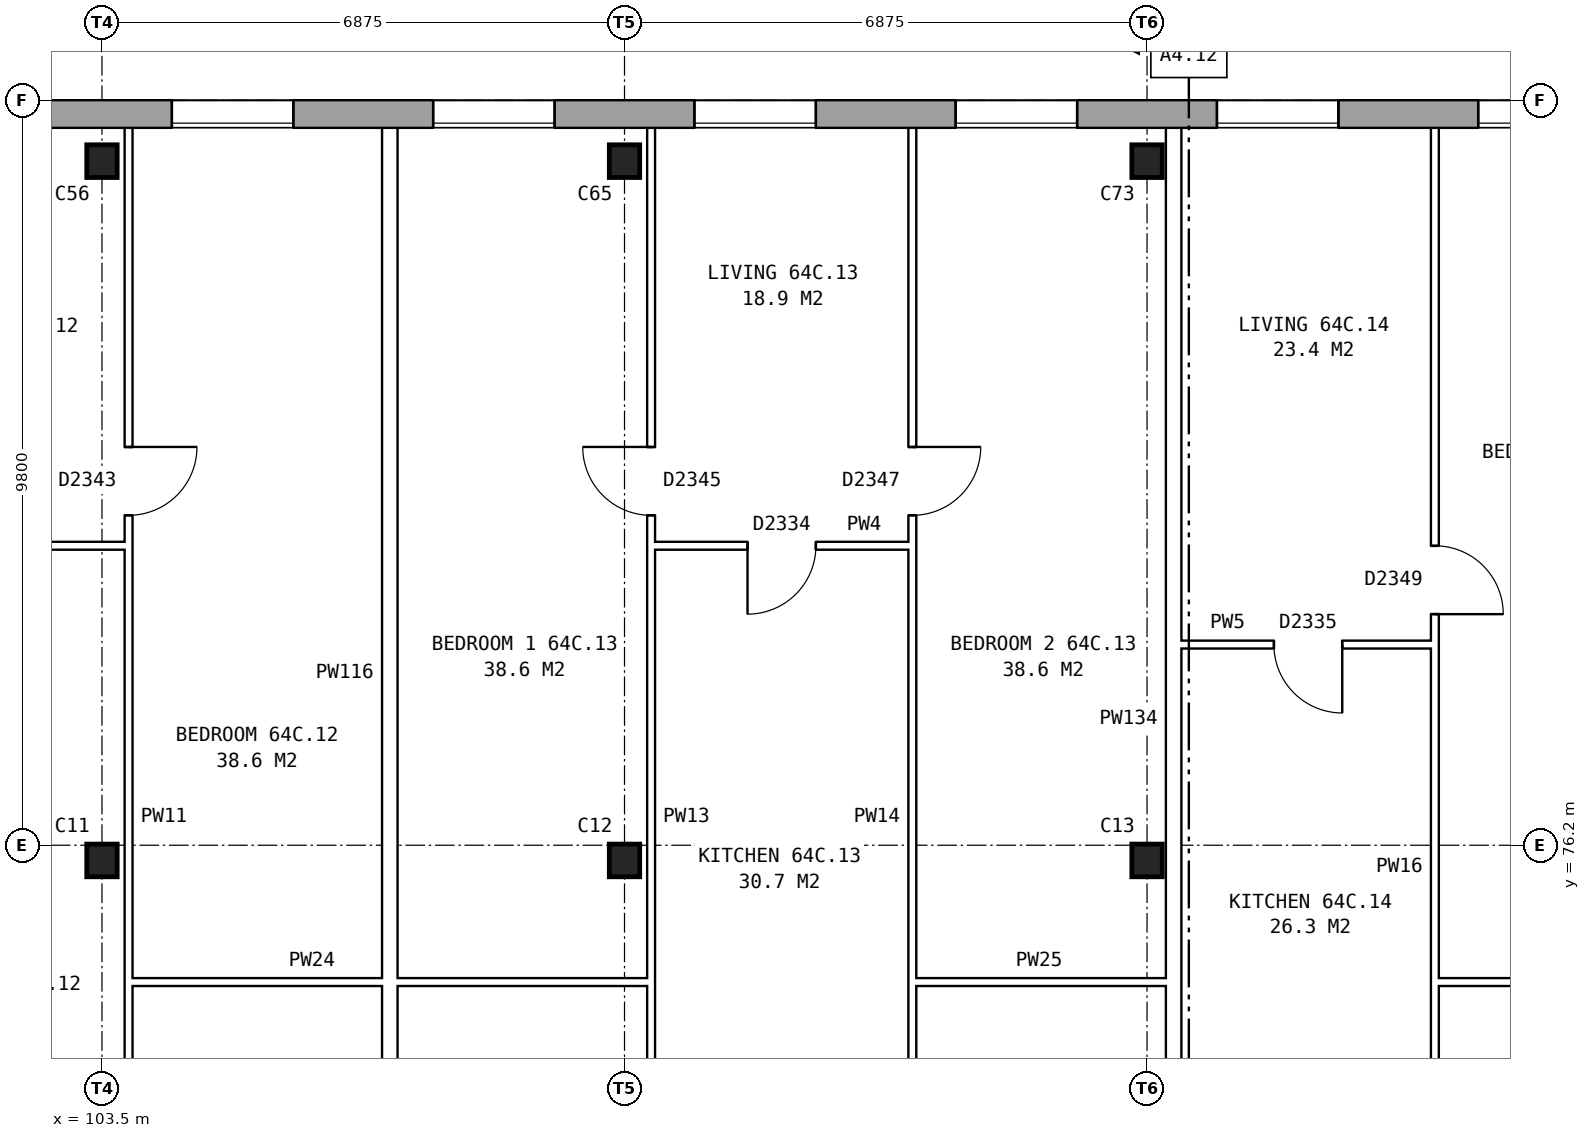
"""IFC4 building model, lengths in metres.
Left out: names, types, materials, properties, quantities, classifications, styles, units other than length and angle.
Written with IfcOpenShell. Run it as: python <this file> out.ifc"""

import sys

from ifc_helpers import new_model, si_unit, direction, frame, frame_2d, origin, origin_2d, place, context, subcontext, project, spatial, rectangle, i_section, extrude, element, fill, save


model = new_model("IFC4")
c1 = context("Model", 3, precision=1e-05, world=origin(), true_north=direction((0.0, 1.0)))
c2 = subcontext(c1, "Body", "Model", "MODEL_VIEW")
j1 = project(units=[si_unit("LENGTHUNIT", "METRE"), si_unit("PLANEANGLEUNIT", "RADIAN")], contexts=[c1])
p1 = place(None, origin())
s1 = spatial("IfcSite", under=j1, at=p1, CompositionType="ELEMENT")
p2 = place(p1, origin())
s2 = spatial("IfcBuilding", under=s1, at=p2, CompositionType="ELEMENT")
p3 = place(p2, frame((0.0, 0.0, 227.6)))
s3 = spatial("IfcBuildingStorey", under=s2, at=p3, CompositionType="ELEMENT", Elevation=227.6)
for number, where, z_axis, x_axis in (
    (1, (103.5, 76.0, 0.0), (0.0, 0.0, 1.0), (1.0, 0.0, 0.0)),
    (2, (110.375, 76.0, 0.0), (0.0, 0.0, 1.0), (1.0, 0.0, 0.0)),
    (3, (117.25, 76.0, 0.0), (0.0, 0.0, 1.0), (1.0, 0.0, 0.0)),
    (4, (103.5, 85.2, 0.0), (0.0, 0.0, 1.0), (1.0, 0.0, 0.0)),
    (5, (110.375, 85.2, 0.0), (0.0, 0.0, 1.0), (1.0, 0.0, 0.0)),
    (6, (117.25, 85.2, 0.0), (0.0, 0.0, 1.0), (1.0, 0.0, 0.0)),
):
    element("IfcColumn", number, at=place(p3, frame(where, z_axis=z_axis, x_axis=x_axis)), inside=s3, PredefinedType="COLUMN", context=c2, shape_type="SweptSolid", body=[
        extrude(i_section(OverallWidth=0.4, OverallDepth=0.43, WebThickness=0.04, FlangeThickness=0.04, at=origin_2d()), origin(), (0.0, 0.0, 1.0), 2.85),
    ])
p4 = place(p3, frame((131.05, 85.82, 0.0), z_axis=(0.0, 0.0, 1.0), x_axis=(-1.0, 0.0, 0.0)))
e7 = element("IfcWall", 7, at=p4, inside=s3, PredefinedType="STANDARD", context=c2, shape_type="SweptSolid", body=[
    extrude(rectangle(XDim=55.1, YDim=0.36, at=frame_2d((27.55, 0.0))), origin(), (0.0, 0.0, 1.0), 2.85),
])
p5 = place(p4, frame((0.969, 0.0, 0.8)))
e8 = element("IfcOpeningElement", 8, at=p5, cuts=e7, PredefinedType="OPENING", context=c2, shape_type="SweptSolid", body=[
    extrude(rectangle(XDim=1.6, YDim=1.8, at=frame_2d((0.8, 0.9))), frame((0.0, 0.19, 0.0), z_axis=(0.0, -1.0, 0.0), x_axis=(1.0, 0.0, 0.0)), (0.0, 0.0, 1.0), 0.38),
])
p6 = place(p4, frame((4.406, 0.0, 0.8)))
e9 = element("IfcOpeningElement", 9, at=p6, cuts=e7, PredefinedType="OPENING", context=c2, shape_type="SweptSolid", body=[
    extrude(rectangle(XDim=1.6, YDim=1.8, at=frame_2d((0.8, 0.9))), frame((0.0, 0.19, 0.0), z_axis=(0.0, -1.0, 0.0), x_axis=(1.0, 0.0, 0.0)), (0.0, 0.0, 1.0), 0.38),
])
p7 = place(p4, frame((7.844, 0.0, 0.8)))
e10 = element("IfcOpeningElement", 10, at=p7, cuts=e7, PredefinedType="OPENING", context=c2, shape_type="SweptSolid", body=[
    extrude(rectangle(XDim=1.6, YDim=1.8, at=frame_2d((0.8, 0.9))), frame((0.0, 0.19, 0.0), z_axis=(0.0, -1.0, 0.0), x_axis=(1.0, 0.0, 0.0)), (0.0, 0.0, 1.0), 0.38),
])
p8 = place(p4, frame((11.281, 0.0, 0.8)))
e11 = element("IfcOpeningElement", 11, at=p8, cuts=e7, PredefinedType="OPENING", context=c2, shape_type="SweptSolid", body=[
    extrude(rectangle(XDim=1.6, YDim=1.8, at=frame_2d((0.8, 0.9))), frame((0.0, 0.19, 0.0), z_axis=(0.0, -1.0, 0.0), x_axis=(1.0, 0.0, 0.0)), (0.0, 0.0, 1.0), 0.38),
])
p9 = place(p4, frame((14.719, 0.0, 0.8)))
e12 = element("IfcOpeningElement", 12, at=p9, cuts=e7, PredefinedType="OPENING", context=c2, shape_type="SweptSolid", body=[
    extrude(rectangle(XDim=1.6, YDim=1.8, at=frame_2d((0.8, 0.9))), frame((0.0, 0.19, 0.0), z_axis=(0.0, -1.0, 0.0), x_axis=(1.0, 0.0, 0.0)), (0.0, 0.0, 1.0), 0.38),
])
p10 = place(p4, frame((18.156, 0.0, 0.8)))
e13 = element("IfcOpeningElement", 13, at=p10, cuts=e7, PredefinedType="OPENING", context=c2, shape_type="SweptSolid", body=[
    extrude(rectangle(XDim=1.6, YDim=1.8, at=frame_2d((0.8, 0.9))), frame((0.0, 0.19, 0.0), z_axis=(0.0, -1.0, 0.0), x_axis=(1.0, 0.0, 0.0)), (0.0, 0.0, 1.0), 0.38),
])
p11 = place(p4, frame((21.594, 0.0, 0.8)))
e14 = element("IfcOpeningElement", 14, at=p11, cuts=e7, PredefinedType="OPENING", context=c2, shape_type="SweptSolid", body=[
    extrude(rectangle(XDim=1.6, YDim=1.8, at=frame_2d((0.8, 0.9))), frame((0.0, 0.19, 0.0), z_axis=(0.0, -1.0, 0.0), x_axis=(1.0, 0.0, 0.0)), (0.0, 0.0, 1.0), 0.38),
])
p12 = place(p4, frame((25.031, 0.0, 0.8)))
e15 = element("IfcOpeningElement", 15, at=p12, cuts=e7, PredefinedType="OPENING", context=c2, shape_type="SweptSolid", body=[
    extrude(rectangle(XDim=1.6, YDim=1.8, at=frame_2d((0.8, 0.9))), frame((0.0, 0.19, 0.0), z_axis=(0.0, -1.0, 0.0), x_axis=(1.0, 0.0, 0.0)), (0.0, 0.0, 1.0), 0.38),
])
p13 = place(p4, frame((28.469, 0.0, 0.8)))
e16 = element("IfcOpeningElement", 16, at=p13, cuts=e7, PredefinedType="OPENING", context=c2, shape_type="SweptSolid", body=[
    extrude(rectangle(XDim=1.6, YDim=1.8, at=frame_2d((0.8, 0.9))), frame((0.0, 0.19, 0.0), z_axis=(0.0, -1.0, 0.0), x_axis=(1.0, 0.0, 0.0)), (0.0, 0.0, 1.0), 0.38),
])
p14 = place(p4, frame((31.906, 0.0, 0.8)))
e17 = element("IfcOpeningElement", 17, at=p14, cuts=e7, PredefinedType="OPENING", context=c2, shape_type="SweptSolid", body=[
    extrude(rectangle(XDim=1.6, YDim=1.8, at=frame_2d((0.8, 0.9))), frame((0.0, 0.19, 0.0), z_axis=(0.0, -1.0, 0.0), x_axis=(1.0, 0.0, 0.0)), (0.0, 0.0, 1.0), 0.38),
])
p15 = place(p4, frame((35.344, 0.0, 0.8)))
e18 = element("IfcOpeningElement", 18, at=p15, cuts=e7, PredefinedType="OPENING", context=c2, shape_type="SweptSolid", body=[
    extrude(rectangle(XDim=1.6, YDim=1.8, at=frame_2d((0.8, 0.9))), frame((0.0, 0.19, 0.0), z_axis=(0.0, -1.0, 0.0), x_axis=(1.0, 0.0, 0.0)), (0.0, 0.0, 1.0), 0.38),
])
p16 = place(p4, frame((38.781, 0.0, 0.8)))
e19 = element("IfcOpeningElement", 19, at=p16, cuts=e7, PredefinedType="OPENING", context=c2, shape_type="SweptSolid", body=[
    extrude(rectangle(XDim=1.6, YDim=1.8, at=frame_2d((0.8, 0.9))), frame((0.0, 0.19, 0.0), z_axis=(0.0, -1.0, 0.0), x_axis=(1.0, 0.0, 0.0)), (0.0, 0.0, 1.0), 0.38),
])
p17 = place(p4, frame((42.219, 0.0, 0.8)))
e20 = element("IfcOpeningElement", 20, at=p17, cuts=e7, PredefinedType="OPENING", context=c2, shape_type="SweptSolid", body=[
    extrude(rectangle(XDim=1.6, YDim=1.8, at=frame_2d((0.8, 0.9))), frame((0.0, 0.19, 0.0), z_axis=(0.0, -1.0, 0.0), x_axis=(1.0, 0.0, 0.0)), (0.0, 0.0, 1.0), 0.38),
])
p18 = place(p4, frame((45.656, 0.0, 0.8)))
e21 = element("IfcOpeningElement", 21, at=p18, cuts=e7, PredefinedType="OPENING", context=c2, shape_type="SweptSolid", body=[
    extrude(rectangle(XDim=1.6, YDim=1.8, at=frame_2d((0.8, 0.9))), frame((0.0, 0.19, 0.0), z_axis=(0.0, -1.0, 0.0), x_axis=(1.0, 0.0, 0.0)), (0.0, 0.0, 1.0), 0.38),
])
p19 = place(p4, frame((49.094, 0.0, 0.8)))
e22 = element("IfcOpeningElement", 22, at=p19, cuts=e7, PredefinedType="OPENING", context=c2, shape_type="SweptSolid", body=[
    extrude(rectangle(XDim=1.6, YDim=1.8, at=frame_2d((0.8, 0.9))), frame((0.0, 0.19, 0.0), z_axis=(0.0, -1.0, 0.0), x_axis=(1.0, 0.0, 0.0)), (0.0, 0.0, 1.0), 0.38),
])
p20 = place(p4, frame((52.531, 0.0, 0.8)))
e23 = element("IfcOpeningElement", 23, at=p20, cuts=e7, PredefinedType="OPENING", context=c2, shape_type="SweptSolid", body=[
    extrude(rectangle(XDim=1.6, YDim=1.8, at=frame_2d((0.8, 0.9))), frame((0.0, 0.19, 0.0), z_axis=(0.0, -1.0, 0.0), x_axis=(1.0, 0.0, 0.0)), (0.0, 0.0, 1.0), 0.38),
])
p21 = place(p3, frame((103.85, 74.4, 0.0), z_axis=(0.0, 0.0, 1.0), x_axis=(1.0, 0.0, 0.0)))
e24 = element("IfcWall", 24, at=p21, inside=s3, PredefinedType="PARTITIONING", context=c2, shape_type="SweptSolid", body=[
    extrude(rectangle(XDim=6.875, YDim=0.1, at=frame_2d((3.438, 0.0))), origin(), (0.0, 0.0, 1.0), 2.85),
])
for number, where, z_axis, x_axis in (
    (25, (114.162, 74.4, 0.0), (0.0, 0.0, 1.0), (1.0, 0.0, 0.0)),
    (26, (121.037, 74.4, 0.0), (0.0, 0.0, 1.0), (1.0, 0.0, 0.0)),
):
    element("IfcWall", number, at=place(p3, frame(where, z_axis=z_axis, x_axis=x_axis)), inside=s3, PredefinedType="PARTITIONING", context=c2, shape_type="SweptSolid", body=[
        extrude(rectangle(XDim=3.338, YDim=0.1, at=frame_2d((1.669, 0.0))), origin(), (0.0, 0.0, 1.0), 2.85),
    ])
p22 = place(p3, frame((117.7, 78.84, 0.0), z_axis=(0.0, 0.0, 1.0), x_axis=(1.0, 0.0, 0.0)))
e27 = element("IfcWall", 27, at=p22, inside=s3, PredefinedType="PARTITIONING", context=c2, shape_type="SweptSolid", body=[
    extrude(rectangle(XDim=3.337, YDim=0.1, at=frame_2d((1.668, 0.0))), origin(), (0.0, 0.0, 1.0), 2.85),
])
p23 = place(p22, frame((1.219, 0.0, 0.0)))
e28 = element("IfcOpeningElement", 28, at=p23, cuts=e27, PredefinedType="OPENING", context=c2, shape_type="SweptSolid", body=[
    extrude(rectangle(XDim=0.9, YDim=2.1, at=frame_2d((0.45, 1.05))), frame((0.0, 0.06, 0.0), z_axis=(0.0, -1.0, 0.0), x_axis=(1.0, 0.0, 0.0)), (0.0, 0.0, 1.0), 0.12),
])
p24 = place(p3, frame((100.512, 80.14, 0.0), z_axis=(0.0, 0.0, 1.0), x_axis=(1.0, 0.0, 0.0)))
e29 = element("IfcWall", 29, at=p24, inside=s3, PredefinedType="PARTITIONING", context=c2, shape_type="SweptSolid", body=[
    extrude(rectangle(XDim=3.338, YDim=0.1, at=frame_2d((1.669, 0.0))), origin(), (0.0, 0.0, 1.0), 2.85),
])
p25 = place(p24, frame((1.219, 0.0, 0.0)))
e30 = element("IfcOpeningElement", 30, at=p25, cuts=e29, PredefinedType="OPENING", context=c2, shape_type="SweptSolid", body=[
    extrude(rectangle(XDim=0.9, YDim=2.1, at=frame_2d((0.45, 1.05))), frame((0.0, 0.06, 0.0), z_axis=(0.0, -1.0, 0.0), x_axis=(1.0, 0.0, 0.0)), (0.0, 0.0, 1.0), 0.12),
])
p26 = place(p3, frame((110.725, 80.14, 0.0), z_axis=(0.0, 0.0, 1.0), x_axis=(1.0, 0.0, 0.0)))
e31 = element("IfcWall", 31, at=p26, inside=s3, PredefinedType="PARTITIONING", context=c2, shape_type="SweptSolid", body=[
    extrude(rectangle(XDim=3.437, YDim=0.1, at=frame_2d((1.719, 0.0))), origin(), (0.0, 0.0, 1.0), 2.85),
])
p27 = place(p26, frame((1.269, 0.0, 0.0)))
e32 = element("IfcOpeningElement", 32, at=p27, cuts=e31, PredefinedType="OPENING", context=c2, shape_type="SweptSolid", body=[
    extrude(rectangle(XDim=0.9, YDim=2.1, at=frame_2d((0.45, 1.05))), frame((0.0, 0.06, 0.0), z_axis=(0.0, -1.0, 0.0), x_axis=(1.0, 0.0, 0.0)), (0.0, 0.0, 1.0), 0.12),
])
p28 = place(p3, frame((103.85, 71.3, 0.0), z_axis=(0.0, 0.0, 1.0), x_axis=(0.0, 1.0, 0.0)))
e33 = element("IfcWall", 33, at=p28, inside=s3, PredefinedType="PARTITIONING", context=c2, shape_type="SweptSolid", body=[
    extrude(rectangle(XDim=14.34, YDim=0.1, at=frame_2d((7.17, 0.0))), origin(), (0.0, 0.0, 1.0), 2.85),
])
p29 = place(p28, frame((9.24, 0.0, 0.0)))
e34 = element("IfcOpeningElement", 34, at=p29, cuts=e33, PredefinedType="OPENING", context=c2, shape_type="SweptSolid", body=[
    extrude(rectangle(XDim=0.9, YDim=2.1, at=frame_2d((0.45, 1.05))), frame((0.0, 0.06, 0.0), z_axis=(0.0, -1.0, 0.0), x_axis=(1.0, 0.0, 0.0)), (0.0, 0.0, 1.0), 0.12),
])
p30 = place(p28, frame((0.4, 0.0, 0.0)))
e35 = element("IfcOpeningElement", 35, at=p30, cuts=e33, PredefinedType="OPENING", context=c2, shape_type="SweptSolid", body=[
    extrude(rectangle(XDim=0.9, YDim=2.1, at=frame_2d((0.45, 1.05))), frame((0.0, 0.06, 0.0), z_axis=(0.0, -1.0, 0.0), x_axis=(1.0, 0.0, 0.0)), (0.0, 0.0, 1.0), 0.12),
])
p31 = place(p3, frame((107.287, 71.3, 0.0), z_axis=(0.0, 0.0, 1.0), x_axis=(0.0, 1.0, 0.0)))
e36 = element("IfcWall", 36, at=p31, inside=s3, PredefinedType="PARTITIONING", context=c2, shape_type="SweptSolid", body=[
    extrude(rectangle(XDim=14.34, YDim=0.2, at=frame_2d((7.17, 0.0))), origin(), (0.0, 0.0, 1.0), 2.85),
])
p32 = place(p3, frame((110.725, 71.3, 0.0), z_axis=(0.0, 0.0, 1.0), x_axis=(0.0, 1.0, 0.0)))
e37 = element("IfcWall", 37, at=p32, inside=s3, PredefinedType="PARTITIONING", context=c2, shape_type="SweptSolid", body=[
    extrude(rectangle(XDim=14.34, YDim=0.1, at=frame_2d((7.17, 0.0))), origin(), (0.0, 0.0, 1.0), 2.85),
])
p33 = place(p32, frame((9.24, 0.0, 0.0)))
e38 = element("IfcOpeningElement", 38, at=p33, cuts=e37, PredefinedType="OPENING", context=c2, shape_type="SweptSolid", body=[
    extrude(rectangle(XDim=0.9, YDim=2.1, at=frame_2d((0.45, 1.05))), frame((0.0, 0.06, 0.0), z_axis=(0.0, -1.0, 0.0), x_axis=(1.0, 0.0, 0.0)), (0.0, 0.0, 1.0), 0.12),
])
p34 = place(p32, frame((0.4, 0.0, 0.0)))
e39 = element("IfcOpeningElement", 39, at=p34, cuts=e37, PredefinedType="OPENING", context=c2, shape_type="SweptSolid", body=[
    extrude(rectangle(XDim=0.9, YDim=2.1, at=frame_2d((0.45, 1.05))), frame((0.0, 0.06, 0.0), z_axis=(0.0, -1.0, 0.0), x_axis=(1.0, 0.0, 0.0)), (0.0, 0.0, 1.0), 0.12),
])
p35 = place(p3, frame((114.162, 71.3, 0.0), z_axis=(0.0, 0.0, 1.0), x_axis=(0.0, 1.0, 0.0)))
e40 = element("IfcWall", 40, at=p35, inside=s3, PredefinedType="PARTITIONING", context=c2, shape_type="SweptSolid", body=[
    extrude(rectangle(XDim=14.34, YDim=0.1, at=frame_2d((7.17, 0.0))), origin(), (0.0, 0.0, 1.0), 2.85),
])
p36 = place(p35, frame((9.24, 0.0, 0.0)))
e41 = element("IfcOpeningElement", 41, at=p36, cuts=e40, PredefinedType="OPENING", context=c2, shape_type="SweptSolid", body=[
    extrude(rectangle(XDim=0.9, YDim=2.1, at=frame_2d((0.45, 1.05))), frame((0.0, 0.06, 0.0), z_axis=(0.0, -1.0, 0.0), x_axis=(1.0, 0.0, 0.0)), (0.0, 0.0, 1.0), 0.12),
])
p37 = place(p35, frame((0.4, 0.0, 0.0)))
e42 = element("IfcOpeningElement", 42, at=p37, cuts=e40, PredefinedType="OPENING", context=c2, shape_type="SweptSolid", body=[
    extrude(rectangle(XDim=0.9, YDim=2.1, at=frame_2d((0.45, 1.05))), frame((0.0, 0.06, 0.0), z_axis=(0.0, -1.0, 0.0), x_axis=(1.0, 0.0, 0.0)), (0.0, 0.0, 1.0), 0.12),
])
p38 = place(p3, frame((117.6, 71.3, 0.0), z_axis=(0.0, 0.0, 1.0), x_axis=(0.0, 1.0, 0.0)))
e43 = element("IfcWall", 43, at=p38, inside=s3, PredefinedType="PARTITIONING", context=c2, shape_type="SweptSolid", body=[
    extrude(rectangle(XDim=14.34, YDim=0.2, at=frame_2d((7.17, 0.0))), origin(), (0.0, 0.0, 1.0), 2.85),
])
p39 = place(p3, frame((121.037, 71.3, 0.0), z_axis=(0.0, 0.0, 1.0), x_axis=(0.0, 1.0, 0.0)))
e44 = element("IfcWall", 44, at=p39, inside=s3, PredefinedType="PARTITIONING", context=c2, shape_type="SweptSolid", body=[
    extrude(rectangle(XDim=14.34, YDim=0.1, at=frame_2d((7.17, 0.0))), origin(), (0.0, 0.0, 1.0), 2.85),
])
p40 = place(p39, frame((7.94, 0.0, 0.0)))
e45 = element("IfcOpeningElement", 45, at=p40, cuts=e44, PredefinedType="OPENING", context=c2, shape_type="SweptSolid", body=[
    extrude(rectangle(XDim=0.9, YDim=2.1, at=frame_2d((0.45, 1.05))), frame((0.0, 0.06, 0.0), z_axis=(0.0, -1.0, 0.0), x_axis=(1.0, 0.0, 0.0)), (0.0, 0.0, 1.0), 0.12),
])
p41 = place(p39, frame((0.4, 0.0, 0.0)))
e46 = element("IfcOpeningElement", 46, at=p41, cuts=e44, PredefinedType="OPENING", context=c2, shape_type="SweptSolid", body=[
    extrude(rectangle(XDim=0.9, YDim=2.1, at=frame_2d((0.45, 1.05))), frame((0.0, 0.06, 0.0), z_axis=(0.0, -1.0, 0.0), x_axis=(1.0, 0.0, 0.0)), (0.0, 0.0, 1.0), 0.12),
])
p42 = place(p7, origin())
e47 = element("IfcWindow", 47, at=p42, inside=s3, PartitioningType="SINGLE_PANEL", PredefinedType="WINDOW", context=c2, shape_type="SweptSolid", body=[
    extrude(rectangle(XDim=1.6, YDim=1.8, at=frame_2d((0.8, 0.9))), frame((0.0, 0.15, 0.0), z_axis=(0.0, -1.0, 0.0), x_axis=(1.0, 0.0, 0.0)), (0.0, 0.0, 1.0), 0.06),
])
fill(e10, e47)
p43 = place(p8, origin())
e48 = element("IfcWindow", 48, at=p43, inside=s3, PartitioningType="SINGLE_PANEL", PredefinedType="WINDOW", context=c2, shape_type="SweptSolid", body=[
    extrude(rectangle(XDim=1.6, YDim=1.8, at=frame_2d((0.8, 0.9))), frame((0.0, 0.15, 0.0), z_axis=(0.0, -1.0, 0.0), x_axis=(1.0, 0.0, 0.0)), (0.0, 0.0, 1.0), 0.06),
])
fill(e11, e48)
p44 = place(p9, origin())
e49 = element("IfcWindow", 49, at=p44, inside=s3, PartitioningType="SINGLE_PANEL", PredefinedType="WINDOW", context=c2, shape_type="SweptSolid", body=[
    extrude(rectangle(XDim=1.6, YDim=1.8, at=frame_2d((0.8, 0.9))), frame((0.0, 0.15, 0.0), z_axis=(0.0, -1.0, 0.0), x_axis=(1.0, 0.0, 0.0)), (0.0, 0.0, 1.0), 0.06),
])
fill(e12, e49)
p45 = place(p10, origin())
e50 = element("IfcWindow", 50, at=p45, inside=s3, PartitioningType="SINGLE_PANEL", PredefinedType="WINDOW", context=c2, shape_type="SweptSolid", body=[
    extrude(rectangle(XDim=1.6, YDim=1.8, at=frame_2d((0.8, 0.9))), frame((0.0, 0.15, 0.0), z_axis=(0.0, -1.0, 0.0), x_axis=(1.0, 0.0, 0.0)), (0.0, 0.0, 1.0), 0.06),
])
fill(e13, e50)
p46 = place(p11, origin())
e51 = element("IfcWindow", 51, at=p46, inside=s3, PartitioningType="SINGLE_PANEL", PredefinedType="WINDOW", context=c2, shape_type="SweptSolid", body=[
    extrude(rectangle(XDim=1.6, YDim=1.8, at=frame_2d((0.8, 0.9))), frame((0.0, 0.15, 0.0), z_axis=(0.0, -1.0, 0.0), x_axis=(1.0, 0.0, 0.0)), (0.0, 0.0, 1.0), 0.06),
])
fill(e14, e51)
p47 = place(p12, origin())
e52 = element("IfcWindow", 52, at=p47, inside=s3, PartitioningType="SINGLE_PANEL", PredefinedType="WINDOW", context=c2, shape_type="SweptSolid", body=[
    extrude(rectangle(XDim=1.6, YDim=1.8, at=frame_2d((0.8, 0.9))), frame((0.0, 0.15, 0.0), z_axis=(0.0, -1.0, 0.0), x_axis=(1.0, 0.0, 0.0)), (0.0, 0.0, 1.0), 0.06),
])
fill(e15, e52)
p48 = place(p29, frame((0.9, 0.0, 0.0), z_axis=(0.0, 0.0, 1.0), x_axis=(-1.0, 0.0, 0.0)))
e53 = element("IfcDoor", 53, at=p48, inside=s3, OperationType="SINGLE_SWING_LEFT", PredefinedType="DOOR", context=c2, shape_type="SweptSolid", body=[
    extrude(rectangle(XDim=0.9, YDim=2.1, at=frame_2d((0.45, 1.05))), frame((0.0, 0.025, 0.0), z_axis=(0.0, -1.0, 0.0), x_axis=(1.0, 0.0, 0.0)), (0.0, 0.0, 1.0), 0.05),
])
fill(e34, e53)
p49 = place(p33, origin())
e54 = element("IfcDoor", 54, at=p49, inside=s3, OperationType="SINGLE_SWING_RIGHT", PredefinedType="DOOR", context=c2, shape_type="SweptSolid", body=[
    extrude(rectangle(XDim=0.9, YDim=2.1, at=frame_2d((0.45, 1.05))), frame((0.0, 0.025, 0.0), z_axis=(0.0, -1.0, 0.0), x_axis=(1.0, 0.0, 0.0)), (0.0, 0.0, 1.0), 0.05),
])
fill(e38, e54)
p50 = place(p36, frame((0.9, 0.0, 0.0), z_axis=(0.0, 0.0, 1.0), x_axis=(-1.0, 0.0, 0.0)))
e55 = element("IfcDoor", 55, at=p50, inside=s3, OperationType="SINGLE_SWING_LEFT", PredefinedType="DOOR", context=c2, shape_type="SweptSolid", body=[
    extrude(rectangle(XDim=0.9, YDim=2.1, at=frame_2d((0.45, 1.05))), frame((0.0, 0.025, 0.0), z_axis=(0.0, -1.0, 0.0), x_axis=(1.0, 0.0, 0.0)), (0.0, 0.0, 1.0), 0.05),
])
fill(e41, e55)
p51 = place(p27, frame((0.9, 0.0, 0.0), z_axis=(0.0, 0.0, 1.0), x_axis=(-1.0, 0.0, 0.0)))
e56 = element("IfcDoor", 56, at=p51, inside=s3, OperationType="SINGLE_SWING_RIGHT", PredefinedType="DOOR", context=c2, shape_type="SweptSolid", body=[
    extrude(rectangle(XDim=0.9, YDim=2.1, at=frame_2d((0.45, 1.05))), frame((0.0, 0.025, 0.0), z_axis=(0.0, -1.0, 0.0), x_axis=(1.0, 0.0, 0.0)), (0.0, 0.0, 1.0), 0.05),
])
fill(e32, e56)
p52 = place(p40, frame((0.9, 0.0, 0.0), z_axis=(0.0, 0.0, 1.0), x_axis=(-1.0, 0.0, 0.0)))
e57 = element("IfcDoor", 57, at=p52, inside=s3, OperationType="SINGLE_SWING_RIGHT", PredefinedType="DOOR", context=c2, shape_type="SweptSolid", body=[
    extrude(rectangle(XDim=0.9, YDim=2.1, at=frame_2d((0.45, 1.05))), frame((0.0, 0.025, 0.0), z_axis=(0.0, -1.0, 0.0), x_axis=(1.0, 0.0, 0.0)), (0.0, 0.0, 1.0), 0.05),
])
fill(e45, e57)
p53 = place(p23, frame((0.9, 0.0, 0.0), z_axis=(0.0, 0.0, 1.0), x_axis=(-1.0, 0.0, 0.0)))
e58 = element("IfcDoor", 58, at=p53, inside=s3, OperationType="SINGLE_SWING_LEFT", PredefinedType="DOOR", context=c2, shape_type="SweptSolid", body=[
    extrude(rectangle(XDim=0.9, YDim=2.1, at=frame_2d((0.45, 1.05))), frame((0.0, 0.025, 0.0), z_axis=(0.0, -1.0, 0.0), x_axis=(1.0, 0.0, 0.0)), (0.0, 0.0, 1.0), 0.05),
])
fill(e28, e58)
save(model, sys.argv[1])
